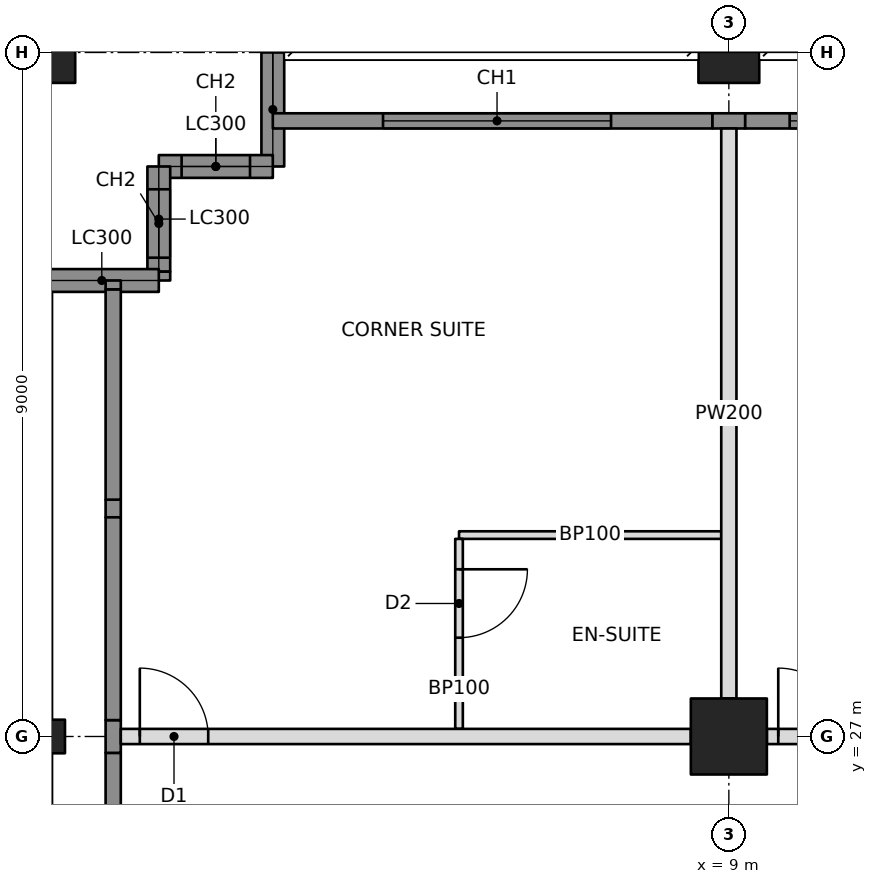
"""IFC4 building model, lengths in metres.
Left out: names, types, materials, properties, quantities, classifications, styles, units other than length and angle.
Written with IfcOpenShell. Run it as: python <this file> out.ifc"""

import sys

from ifc_helpers import new_model, si_unit, direction, frame, frame_2d, origin, origin_2d, place, context, subcontext, project, spatial, rectangle, hollow_rectangle, i_section, extrude, element, fill, save


model = new_model("IFC4")
c1 = context("Model", 3, precision=1e-05, world=origin(), true_north=direction((0.0, 1.0)))
c2 = subcontext(c1, "Body", "Model", "MODEL_VIEW")
j1 = project(units=[si_unit("LENGTHUNIT", "METRE"), si_unit("PLANEANGLEUNIT", "RADIAN")], contexts=[c1])
p1 = place(None, origin())
s1 = spatial("IfcSite", under=j1, at=p1, CompositionType="ELEMENT")
p2 = place(p1, origin())
s2 = spatial("IfcBuilding", under=s1, at=p2, CompositionType="ELEMENT")
p3 = place(p2, frame((0.0, 0.0, 152.0)))
s3 = spatial("IfcBuildingStorey", under=s2, at=p3, CompositionType="ELEMENT", Elevation=152.0)
p4 = place(p3, frame((0.0, 27.0, 0.0), z_axis=(0.0, 0.0, 1.0), x_axis=(0.0, 1.0, 0.0)))
e1 = element("IfcColumn", 1, at=p4, inside=s3, PredefinedType="COLUMN", context=c2, shape_type="SweptSolid", body=[
    extrude(i_section(OverallWidth=0.442, OverallDepth=0.531, WebThickness=0.066, FlangeThickness=0.106, at=origin_2d()), origin(), (0.0, 0.0, 1.0), 3.4),
])
p5 = place(p3, frame((0.0, 36.0, 0.0), z_axis=(0.0, 0.0, 1.0), x_axis=(1.0, 0.0, 0.0)))
e2 = element("IfcColumn", 2, at=p5, inside=s3, PredefinedType="COLUMN", context=c2, shape_type="SweptSolid", body=[
    extrude(hollow_rectangle(XDim=0.8, YDim=0.8, WallThickness=0.06, at=origin_2d()), origin(), (0.0, 0.0, 1.0), 3.4),
])
p6 = place(p3, frame((9.0, 27.0, 0.0), z_axis=(0.0, 0.0, 1.0), x_axis=(1.0, 0.0, 0.0)))
e3 = element("IfcColumn", 3, at=p6, inside=s3, PredefinedType="COLUMN", context=c2, shape_type="SweptSolid", body=[
    extrude(hollow_rectangle(XDim=1.0, YDim=1.0, WallThickness=0.1, at=origin_2d()), origin(), (0.0, 0.0, 1.0), 3.4),
])
p7 = place(p3, frame((9.0, 36.0, 0.0), z_axis=(0.0, 0.0, 1.0), x_axis=(1.0, 0.0, 0.0)))
e4 = element("IfcColumn", 4, at=p7, inside=s3, PredefinedType="COLUMN", context=c2, shape_type="SweptSolid", body=[
    extrude(hollow_rectangle(XDim=0.8, YDim=0.8, WallThickness=0.06, at=origin_2d()), origin(), (0.0, 0.0, 1.0), 3.4),
])
p8 = place(p3, frame((3.0, 36.0, 0.0), z_axis=(0.0, 0.0, 1.0), x_axis=(0.0, -1.0, 0.0)))
e5 = element("IfcWall", 5, at=p8, inside=s3, PredefinedType="SOLIDWALL", context=c2, shape_type="SweptSolid", body=[
    extrude(rectangle(XDim=1.5, YDim=0.3, at=frame_2d((0.75, 0.0))), origin(), (0.0, 0.0, 1.0), 2.202),
])
p9 = place(p3, frame((3.0, 34.5, 0.0), z_axis=(0.0, 0.0, 1.0), x_axis=(-1.0, 0.0, 0.0)))
e6 = element("IfcWall", 6, at=p9, inside=s3, PredefinedType="SOLIDWALL", context=c2, shape_type="SweptSolid", body=[
    extrude(rectangle(XDim=1.5, YDim=0.3, at=frame_2d((0.75, 0.0))), origin(), (0.0, 0.0, 1.0), 3.15),
])
p10 = place(p9, frame((0.3, 0.0, 0.6)))
e7 = element("IfcOpeningElement", 7, at=p10, cuts=e6, PredefinedType="OPENING", context=c2, shape_type="SweptSolid", body=[
    extrude(rectangle(XDim=0.9, YDim=2.2, at=frame_2d((0.45, 1.1))), frame((0.0, 0.16, 0.0), z_axis=(0.0, -1.0, 0.0), x_axis=(1.0, 0.0, 0.0)), (0.0, 0.0, 1.0), 0.32),
])
p11 = place(p3, frame((1.5, 34.5, 0.0), z_axis=(0.0, 0.0, 1.0), x_axis=(0.0, -1.0, 0.0)))
e8 = element("IfcWall", 8, at=p11, inside=s3, PredefinedType="SOLIDWALL", context=c2, shape_type="SweptSolid", body=[
    extrude(rectangle(XDim=1.384, YDim=0.3, at=frame_2d((0.692, 0.0))), origin(), (0.0, 0.0, 1.0), 3.15),
])
p12 = place(p11, frame((0.3, 0.0, 0.6)))
e9 = element("IfcOpeningElement", 9, at=p12, cuts=e8, PredefinedType="OPENING", context=c2, shape_type="SweptSolid", body=[
    extrude(rectangle(XDim=0.9, YDim=2.2, at=frame_2d((0.45, 1.1))), frame((0.0, 0.16, 0.0), z_axis=(0.0, -1.0, 0.0), x_axis=(1.0, 0.0, 0.0)), (0.0, 0.0, 1.0), 0.32),
])
p13 = place(p3, frame((1.5, 33.0, 0.0), z_axis=(0.0, 0.0, 1.0), x_axis=(-1.0, 0.0, 0.0)))
e10 = element("IfcWall", 10, at=p13, inside=s3, PredefinedType="SOLIDWALL", context=c2, shape_type="SweptSolid", body=[
    extrude(rectangle(XDim=1.5, YDim=0.3, at=frame_2d((0.75, 0.0))), origin(), (0.0, 0.0, 1.0), 2.202),
])
p14 = place(p3, frame((3.0, 35.1, 0.0), z_axis=(0.0, 0.0, 1.0), x_axis=(1.0, 0.0, 0.0)))
e11 = element("IfcWall", 11, at=p14, inside=s3, PredefinedType="SOLIDWALL", context=c2, shape_type="SweptSolid", body=[
    extrude(rectangle(XDim=5.785, YDim=0.2, at=frame_2d((2.892, 0.0))), origin(), (0.0, 0.0, 1.0), 3.15),
])
p15 = place(p14, frame((1.45, 0.0, 0.6)))
e12 = element("IfcOpeningElement", 12, at=p15, cuts=e11, PredefinedType="OPENING", context=c2, shape_type="SweptSolid", body=[
    extrude(rectangle(XDim=3.0, YDim=2.2, at=frame_2d((1.5, 1.1))), frame((0.0, 0.11, 0.0), z_axis=(0.0, -1.0, 0.0), x_axis=(1.0, 0.0, 0.0)), (0.0, 0.0, 1.0), 0.22),
])
p16 = place(p3, frame((1.0, 27.0, 0.0), z_axis=(0.0, 0.0, 1.0), x_axis=(1.0, 0.0, 0.0)))
e13 = element("IfcWall", 13, at=p16, inside=s3, PredefinedType="PARTITIONING", context=c2, shape_type="SweptSolid", body=[
    extrude(rectangle(XDim=7.5, YDim=0.2, at=frame_2d((3.75, 0.0))), origin(), (0.0, 0.0, 1.0), 2.21),
])
p17 = place(p16, frame((0.25, 0.0, 0.0)))
e14 = element("IfcOpeningElement", 14, at=p17, cuts=e13, PredefinedType="OPENING", context=c2, shape_type="SweptSolid", body=[
    extrude(rectangle(XDim=0.9, YDim=2.1, at=frame_2d((0.45, 1.05))), frame((0.0, 0.11, 0.0), z_axis=(0.0, -1.0, 0.0), x_axis=(1.0, 0.0, 0.0)), (0.0, 0.0, 1.0), 0.22),
])
p18 = place(p3, frame((9.5, 27.0, 0.0), z_axis=(0.0, 0.0, 1.0), x_axis=(1.0, 0.0, 0.0)))
e15 = element("IfcWall", 15, at=p18, inside=s3, PredefinedType="PARTITIONING", context=c2, shape_type="SweptSolid", body=[
    extrude(rectangle(XDim=8.0, YDim=0.2, at=frame_2d((4.0, 0.0))), origin(), (0.0, 0.0, 1.0), 2.21),
])
p19 = place(p18, frame((0.15, 0.0, 0.0)))
e16 = element("IfcOpeningElement", 16, at=p19, cuts=e15, PredefinedType="OPENING", context=c2, shape_type="SweptSolid", body=[
    extrude(rectangle(XDim=0.9, YDim=2.1, at=frame_2d((0.45, 1.05))), frame((0.0, 0.11, 0.0), z_axis=(0.0, -1.0, 0.0), x_axis=(1.0, 0.0, 0.0)), (0.0, 0.0, 1.0), 0.22),
])
p20 = place(p3, frame((9.0, 27.5, 0.0), z_axis=(0.0, 0.0, 1.0), x_axis=(0.0, 1.0, 0.0)))
e17 = element("IfcWall", 17, at=p20, inside=s3, PredefinedType="PARTITIONING", context=c2, shape_type="SweptSolid", body=[
    extrude(rectangle(XDim=7.5, YDim=0.2, at=frame_2d((3.75, 0.0))), origin(), (0.0, 0.0, 1.0), 2.21),
])
p21 = place(p3, frame((5.45, 29.65, 0.0), z_axis=(0.0, 0.0, 1.0), x_axis=(1.0, 0.0, 0.0)))
e18 = element("IfcWall", 18, at=p21, inside=s3, PredefinedType="PARTITIONING", context=c2, shape_type="SweptSolid", body=[
    extrude(rectangle(XDim=3.45, YDim=0.1, at=frame_2d((1.725, 0.0))), origin(), (0.0, 0.0, 1.0), 2.21),
])
p22 = place(p3, frame((5.45, 27.1, 0.0), z_axis=(0.0, 0.0, 1.0), x_axis=(0.0, 1.0, 0.0)))
e19 = element("IfcWall", 19, at=p22, inside=s3, PredefinedType="PARTITIONING", context=c2, shape_type="SweptSolid", body=[
    extrude(rectangle(XDim=2.5, YDim=0.1, at=frame_2d((1.25, 0.0))), origin(), (0.0, 0.0, 1.0), 2.21),
])
p23 = place(p22, frame((1.2, 0.0, 0.0)))
e20 = element("IfcOpeningElement", 20, at=p23, cuts=e19, PredefinedType="OPENING", context=c2, shape_type="SweptSolid", body=[
    extrude(rectangle(XDim=0.9, YDim=2.1, at=frame_2d((0.45, 1.05))), frame((0.0, 0.06, 0.0), z_axis=(0.0, -1.0, 0.0), x_axis=(1.0, 0.0, 0.0)), (0.0, 0.0, 1.0), 0.12),
])
p24 = place(p3, frame((1.5, 33.116, 0.0), z_axis=(0.0, 0.0, 1.0), x_axis=(0.0, -1.0, 0.0)))
e21 = element("IfcWall", 21, at=p24, inside=s3, PredefinedType="SOLIDWALL", context=c2, shape_type="SweptSolid", body=[
    extrude(rectangle(XDim=0.116, YDim=0.3, at=frame_2d((0.058, 0.0))), origin(), (0.0, 0.0, 1.0), 2.542),
])
p25 = place(p3, frame((0.9, 18.214, 0.0), z_axis=(0.0, 0.0, 1.0), x_axis=(0.0, 1.0, 0.0)))
e22 = element("IfcWall", 22, at=p25, inside=s3, PredefinedType="SOLIDWALL", context=c2, shape_type="SweptSolid", body=[
    extrude(rectangle(XDim=8.571, YDim=0.2, at=frame_2d((4.285, 0.0))), origin(), (0.0, 0.0, 1.0), 3.15),
])
p26 = place(p25, frame((0.136, 0.0, 0.6)))
e23 = element("IfcOpeningElement", 23, at=p26, cuts=e22, PredefinedType="OPENING", context=c2, shape_type="SweptSolid", body=[
    extrude(rectangle(XDim=3.0, YDim=2.2, at=frame_2d((1.5, 1.1))), frame((0.0, 0.11, 0.0), z_axis=(0.0, -1.0, 0.0), x_axis=(1.0, 0.0, 0.0)), (0.0, 0.0, 1.0), 0.22),
])
p27 = place(p25, frame((3.636, 0.0, 0.6)))
e24 = element("IfcOpeningElement", 24, at=p27, cuts=e22, PredefinedType="OPENING", context=c2, shape_type="SweptSolid", body=[
    extrude(rectangle(XDim=3.0, YDim=2.2, at=frame_2d((1.5, 1.1))), frame((0.0, 0.11, 0.0), z_axis=(0.0, -1.0, 0.0), x_axis=(1.0, 0.0, 0.0)), (0.0, 0.0, 1.0), 0.22),
])
p28 = place(p3, frame((0.9, 26.785, 0.0), z_axis=(0.0, 0.0, 1.0), x_axis=(0.0, 1.0, 0.0)))
e25 = element("IfcWall", 25, at=p28, inside=s3, PredefinedType="SOLIDWALL", context=c2, shape_type="SweptSolid", body=[
    extrude(rectangle(XDim=0.431, YDim=0.2, at=frame_2d((0.215, 0.0))), origin(), (0.0, 0.0, 1.0), 2.21),
])
p29 = place(p3, frame((0.9, 27.215, 0.0), z_axis=(0.0, 0.0, 1.0), x_axis=(0.0, 1.0, 0.0)))
e26 = element("IfcWall", 26, at=p29, inside=s3, PredefinedType="SOLIDWALL", context=c2, shape_type="SweptSolid", body=[
    extrude(rectangle(XDim=2.668, YDim=0.2, at=frame_2d((1.334, 0.0))), origin(), (0.0, 0.0, 1.0), 3.15),
])
p30 = place(p3, frame((0.9, 29.884, 0.0), z_axis=(0.0, 0.0, 1.0), x_axis=(0.0, 1.0, 0.0)))
e27 = element("IfcWall", 27, at=p30, inside=s3, PredefinedType="SOLIDWALL", context=c2, shape_type="SweptSolid", body=[
    extrude(rectangle(XDim=0.232, YDim=0.2, at=frame_2d((0.116, 0.0))), origin(), (0.0, 0.0, 1.0), 2.542),
])
p31 = place(p3, frame((0.9, 30.116, 0.0), z_axis=(0.0, 0.0, 1.0), x_axis=(0.0, 1.0, 0.0)))
e28 = element("IfcWall", 28, at=p31, inside=s3, PredefinedType="SOLIDWALL", context=c2, shape_type="SweptSolid", body=[
    extrude(rectangle(XDim=2.768, YDim=0.2, at=frame_2d((1.384, 0.0))), origin(), (0.0, 0.0, 1.0), 3.15),
])
p32 = place(p3, frame((0.9, 32.884, 0.0), z_axis=(0.0, 0.0, 1.0), x_axis=(0.0, 1.0, 0.0)))
e29 = element("IfcWall", 29, at=p32, inside=s3, PredefinedType="SOLIDWALL", context=c2, shape_type="SweptSolid", body=[
    extrude(rectangle(XDim=0.116, YDim=0.2, at=frame_2d((0.058, 0.0))), origin(), (0.0, 0.0, 1.0), 2.542),
])
p33 = place(p3, frame((8.785, 35.1, 0.0), z_axis=(0.0, 0.0, 1.0), x_axis=(1.0, 0.0, 0.0)))
e30 = element("IfcWall", 30, at=p33, inside=s3, PredefinedType="SOLIDWALL", context=c2, shape_type="SweptSolid", body=[
    extrude(rectangle(XDim=0.431, YDim=0.2, at=frame_2d((0.215, 0.0))), origin(), (0.0, 0.0, 1.0), 2.21),
])
p34 = place(p3, frame((9.215, 35.1, 0.0), z_axis=(0.0, 0.0, 1.0), x_axis=(1.0, 0.0, 0.0)))
e31 = element("IfcWall", 31, at=p34, inside=s3, PredefinedType="SOLIDWALL", context=c2, shape_type="SweptSolid", body=[
    extrude(rectangle(XDim=8.571, YDim=0.2, at=frame_2d((4.285, 0.0))), origin(), (0.0, 0.0, 1.0), 3.15),
])
p35 = place(p34, frame((0.585, 0.0, 0.6)))
e32 = element("IfcOpeningElement", 32, at=p35, cuts=e31, PredefinedType="OPENING", context=c2, shape_type="SweptSolid", body=[
    extrude(rectangle(XDim=3.0, YDim=2.2, at=frame_2d((1.5, 1.1))), frame((0.0, 0.11, 0.0), z_axis=(0.0, -1.0, 0.0), x_axis=(1.0, 0.0, 0.0)), (0.0, 0.0, 1.0), 0.22),
])
p36 = place(p34, frame((4.985, 0.0, 0.6)))
e33 = element("IfcOpeningElement", 33, at=p36, cuts=e31, PredefinedType="OPENING", context=c2, shape_type="SweptSolid", body=[
    extrude(rectangle(XDim=3.0, YDim=2.2, at=frame_2d((1.5, 1.1))), frame((0.0, 0.11, 0.0), z_axis=(0.0, -1.0, 0.0), x_axis=(1.0, 0.0, 0.0)), (0.0, 0.0, 1.0), 0.22),
])
p37 = place(p10, origin())
e34 = element("IfcWindow", 34, at=p37, inside=s3, PartitioningType="SINGLE_PANEL", PredefinedType="WINDOW", context=c2, shape_type="SweptSolid", body=[
    extrude(rectangle(XDim=0.9, YDim=2.2, at=frame_2d((0.45, 1.1))), frame((0.0, 0.03, 0.0), z_axis=(0.0, -1.0, 0.0), x_axis=(1.0, 0.0, 0.0)), (0.0, 0.0, 1.0), 0.06),
])
fill(e7, e34)
p38 = place(p12, origin())
e35 = element("IfcWindow", 35, at=p38, inside=s3, PartitioningType="SINGLE_PANEL", PredefinedType="WINDOW", context=c2, shape_type="SweptSolid", body=[
    extrude(rectangle(XDim=0.9, YDim=2.2, at=frame_2d((0.45, 1.1))), frame((0.0, 0.03, 0.0), z_axis=(0.0, -1.0, 0.0), x_axis=(1.0, 0.0, 0.0)), (0.0, 0.0, 1.0), 0.06),
])
fill(e9, e35)
p39 = place(p15, origin())
e36 = element("IfcWindow", 36, at=p39, inside=s3, PartitioningType="TRIPLE_PANEL_VERTICAL", PredefinedType="WINDOW", context=c2, shape_type="SweptSolid", body=[
    extrude(rectangle(XDim=3.0, YDim=2.2, at=frame_2d((1.5, 1.1))), frame((0.0, 0.03, 0.0), z_axis=(0.0, -1.0, 0.0), x_axis=(1.0, 0.0, 0.0)), (0.0, 0.0, 1.0), 0.06),
])
fill(e12, e36)
p40 = place(p35, origin())
e37 = element("IfcWindow", 37, at=p40, inside=s3, PartitioningType="TRIPLE_PANEL_VERTICAL", PredefinedType="WINDOW", context=c2, shape_type="SweptSolid", body=[
    extrude(rectangle(XDim=3.0, YDim=2.2, at=frame_2d((1.5, 1.1))), frame((0.0, 0.03, 0.0), z_axis=(0.0, -1.0, 0.0), x_axis=(1.0, 0.0, 0.0)), (0.0, 0.0, 1.0), 0.06),
])
fill(e32, e37)
p41 = place(p23, frame((0.9, 0.0, 0.0), z_axis=(0.0, 0.0, 1.0), x_axis=(-1.0, 0.0, 0.0)))
e38 = element("IfcDoor", 38, at=p41, inside=s3, OperationType="SINGLE_SWING_LEFT", PredefinedType="DOOR", context=c2, shape_type="SweptSolid", body=[
    extrude(rectangle(XDim=0.9, YDim=2.1, at=frame_2d((0.45, 1.05))), frame((0.0, 0.025, 0.0), z_axis=(0.0, -1.0, 0.0), x_axis=(1.0, 0.0, 0.0)), (0.0, 0.0, 1.0), 0.05),
])
fill(e20, e38)
p42 = place(p17, origin())
e39 = element("IfcDoor", 39, at=p42, inside=s3, OperationType="SINGLE_SWING_LEFT", PredefinedType="DOOR", context=c2, shape_type="SweptSolid", body=[
    extrude(rectangle(XDim=0.9, YDim=2.1, at=frame_2d((0.45, 1.05))), frame((0.0, 0.025, 0.0), z_axis=(0.0, -1.0, 0.0), x_axis=(1.0, 0.0, 0.0)), (0.0, 0.0, 1.0), 0.05),
])
fill(e14, e39)
p43 = place(p19, origin())
e40 = element("IfcDoor", 40, at=p43, inside=s3, OperationType="SINGLE_SWING_LEFT", PredefinedType="DOOR", context=c2, shape_type="SweptSolid", body=[
    extrude(rectangle(XDim=0.9, YDim=2.1, at=frame_2d((0.45, 1.05))), frame((0.0, 0.025, 0.0), z_axis=(0.0, -1.0, 0.0), x_axis=(1.0, 0.0, 0.0)), (0.0, 0.0, 1.0), 0.05),
])
fill(e16, e40)
save(model, sys.argv[1])
